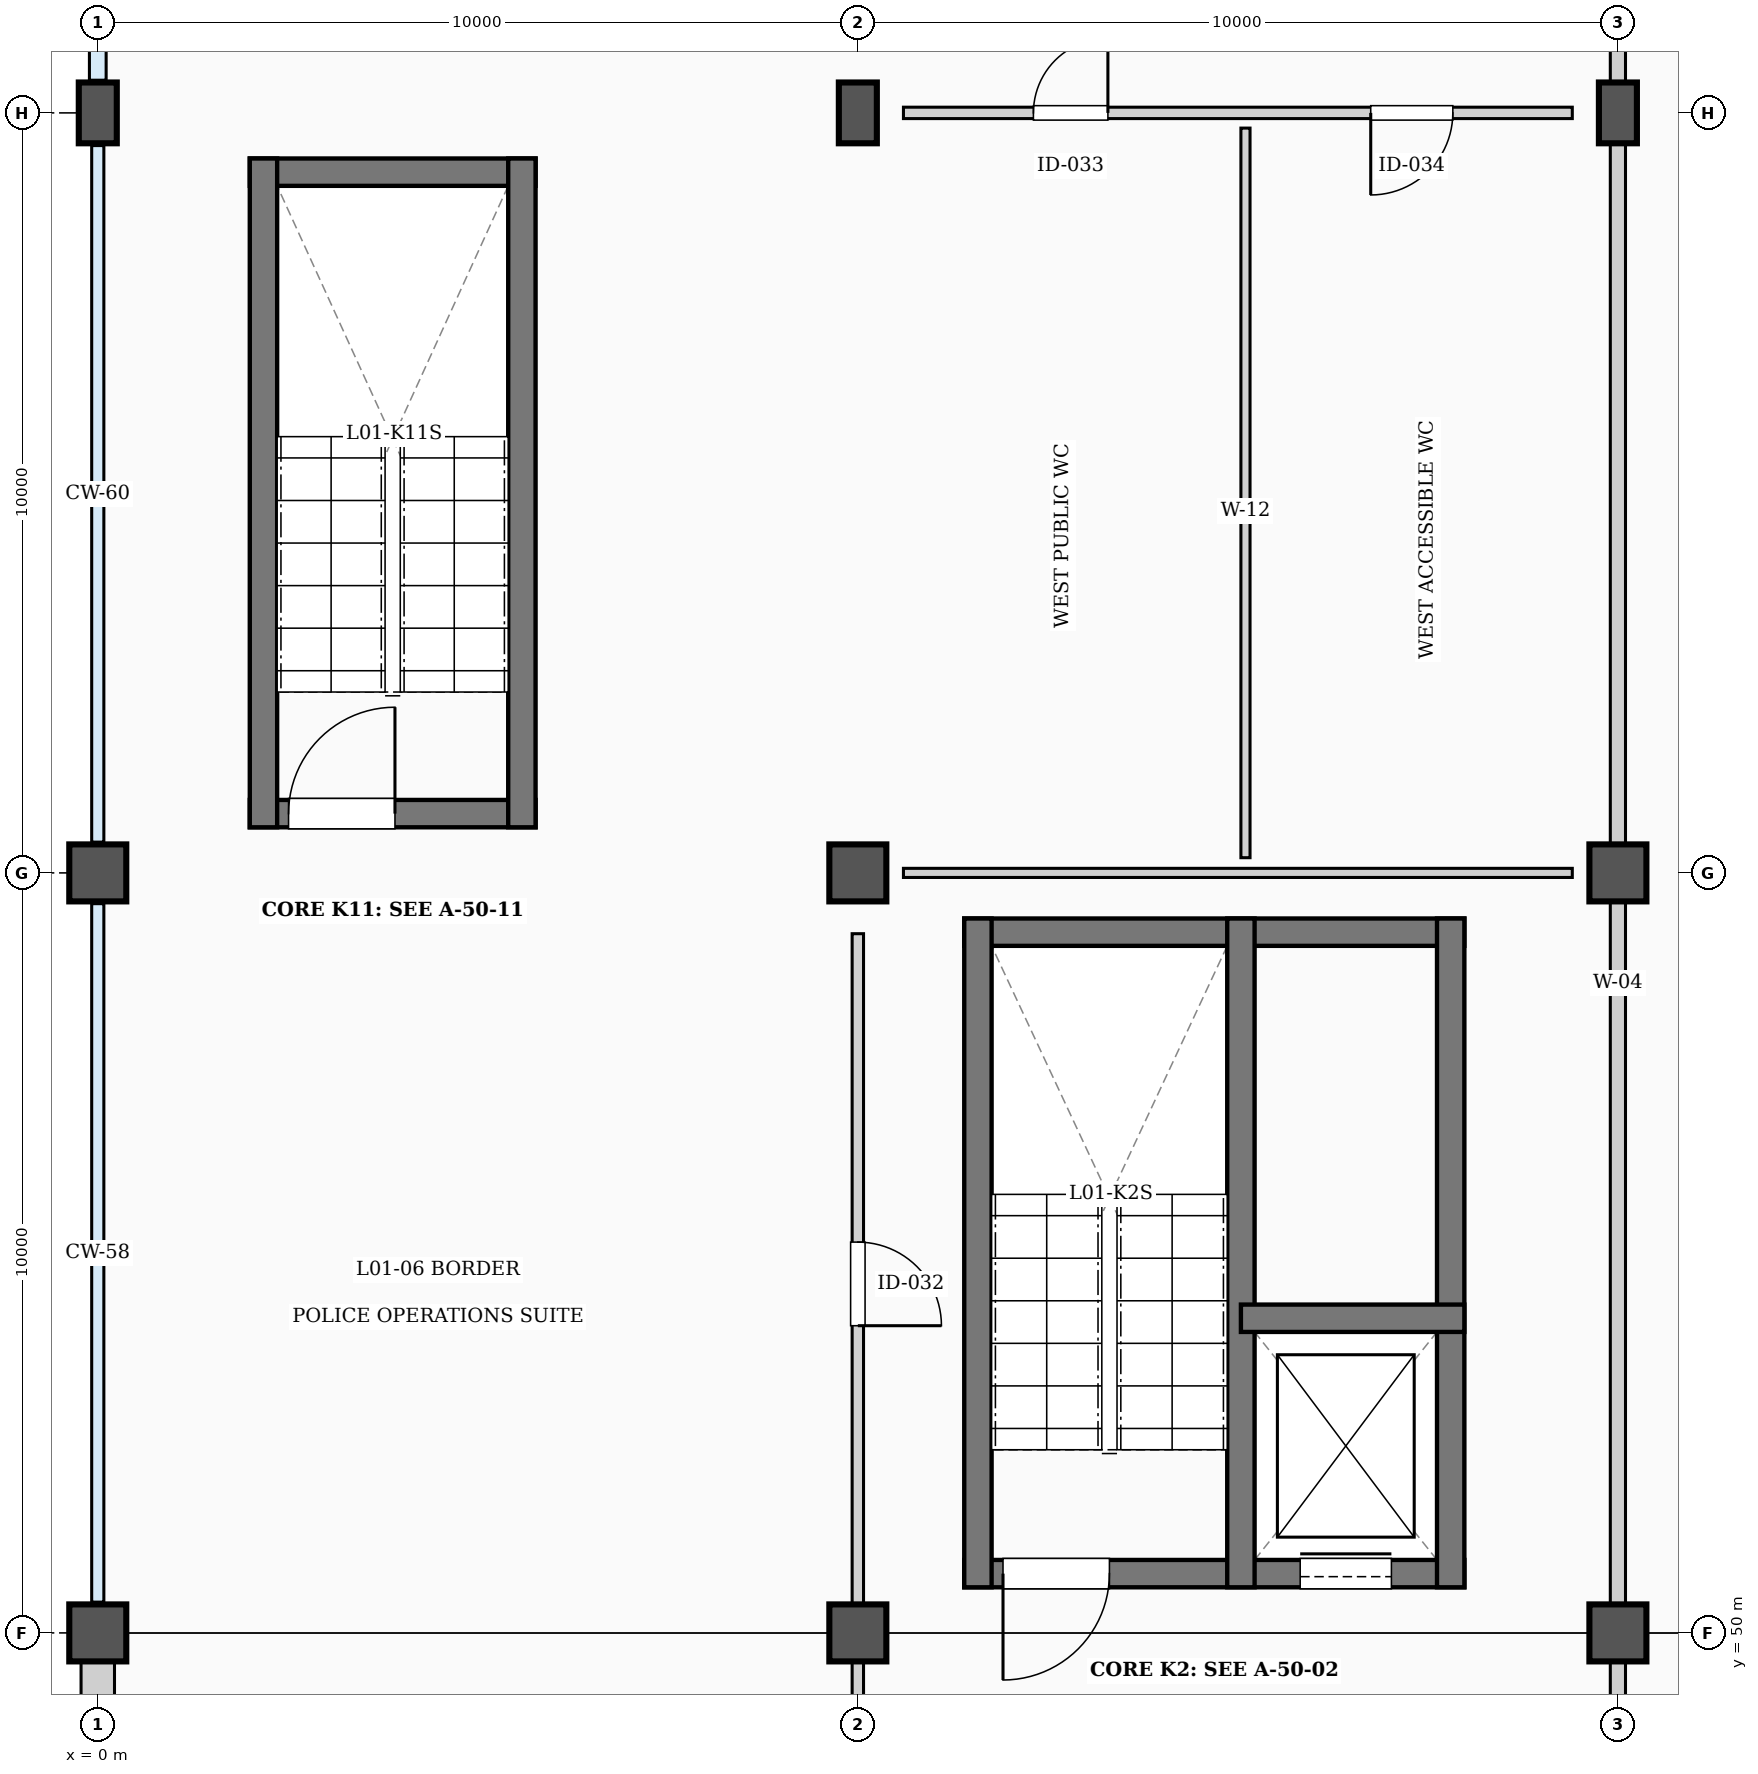
"""IFC4 building model, lengths in metres.
Left out: names, types, materials, properties, quantities, classifications, styles, units other than length and angle.
Written with IfcOpenShell. Run it as: python <this file> out.ifc"""

import sys

from ifc_helpers import new_model, si_unit, direction, frame, frame_2d, origin, origin_2d, place, context, subcontext, project, spatial, rectangle, extrude, element, fill, save


model = new_model("IFC4")
c1 = context("Model", 3, precision=1e-05, world=origin(), true_north=direction((0.0, 1.0)))
c2 = subcontext(c1, "Body", "Model", "MODEL_VIEW")
j1 = project(units=[si_unit("LENGTHUNIT", "METRE"), si_unit("PLANEANGLEUNIT", "RADIAN")], contexts=[c1])
p1 = place(None, origin())
s1 = spatial("IfcSite", under=j1, at=p1, CompositionType="ELEMENT")
p2 = place(p1, origin())
s2 = spatial("IfcBuilding", under=s1, at=p2, CompositionType="ELEMENT")
p3 = place(p2, frame((0.0, 0.0, 5.4)))
s3 = spatial("IfcBuildingStorey", under=s2, at=p3, CompositionType="ELEMENT", Elevation=5.4)
for number, where, z_axis, x_axis in (
    (1, (0.0, 50.0, 0.0), (0.0, 0.0, 1.0), (1.0, 0.0, 0.0)),
    (2, (0.0, 60.0, 0.0), (0.0, 0.0, 1.0), (1.0, 0.0, 0.0)),
):
    element("IfcColumn", number, at=place(p3, frame(where, z_axis=z_axis, x_axis=x_axis)), inside=s3, PredefinedType="COLUMN", context=c2, shape_type="SweptSolid", body=[
        extrude(rectangle(XDim=0.75, YDim=0.75, at=origin_2d()), origin(), (0.0, 0.0, 1.0), 4.8),
    ])
p4 = place(p3, frame((0.0, 70.0, 0.0), z_axis=(0.0, 0.0, 1.0), x_axis=(1.0, 0.0, 0.0)))
e3 = element("IfcColumn", 3, at=p4, inside=s3, PredefinedType="COLUMN", context=c2, shape_type="SweptSolid", body=[
    extrude(rectangle(XDim=0.5, YDim=0.8, at=origin_2d()), origin(), (0.0, 0.0, 1.0), 4.8),
])
for number, where, z_axis, x_axis in (
    (4, (10.0, 50.0, 0.0), (0.0, 0.0, 1.0), (1.0, 0.0, 0.0)),
    (5, (10.0, 60.0, 0.0), (0.0, 0.0, 1.0), (1.0, 0.0, 0.0)),
):
    element("IfcColumn", number, at=place(p3, frame(where, z_axis=z_axis, x_axis=x_axis)), inside=s3, PredefinedType="COLUMN", context=c2, shape_type="SweptSolid", body=[
        extrude(rectangle(XDim=0.75, YDim=0.75, at=origin_2d()), origin(), (0.0, 0.0, 1.0), 4.8),
    ])
p5 = place(p3, frame((10.0, 70.0, 0.0), z_axis=(0.0, 0.0, 1.0), x_axis=(1.0, 0.0, 0.0)))
e6 = element("IfcColumn", 6, at=p5, inside=s3, PredefinedType="COLUMN", context=c2, shape_type="SweptSolid", body=[
    extrude(rectangle(XDim=0.5, YDim=0.8, at=origin_2d()), origin(), (0.0, 0.0, 1.0), 4.8),
])
for number, where, z_axis, x_axis in (
    (7, (20.0, 50.0, 0.0), (0.0, 0.0, 1.0), (1.0, 0.0, 0.0)),
    (8, (20.0, 60.0, 0.0), (0.0, 0.0, 1.0), (1.0, 0.0, 0.0)),
):
    element("IfcColumn", number, at=place(p3, frame(where, z_axis=z_axis, x_axis=x_axis)), inside=s3, PredefinedType="COLUMN", context=c2, shape_type="SweptSolid", body=[
        extrude(rectangle(XDim=0.75, YDim=0.75, at=origin_2d()), origin(), (0.0, 0.0, 1.0), 4.8),
    ])
p6 = place(p3, frame((20.0, 70.0, 0.0), z_axis=(0.0, 0.0, 1.0), x_axis=(1.0, 0.0, 0.0)))
e9 = element("IfcColumn", 9, at=p6, inside=s3, PredefinedType="COLUMN", context=c2, shape_type="SweptSolid", body=[
    extrude(rectangle(XDim=0.5, YDim=0.8, at=origin_2d()), origin(), (0.0, 0.0, 1.0), 4.8),
])
p7 = place(p3, frame((0.0, 40.375, 0.0), z_axis=(0.0, 0.0, 1.0), x_axis=(0.0, 1.0, 0.0)))
e10 = element("IfcWall", 10, at=p7, inside=s3, PredefinedType="SOLIDWALL", context=c2, shape_type="SweptSolid", body=[
    extrude(rectangle(XDim=9.25, YDim=0.44, at=frame_2d((4.625, 0.0))), origin(), (0.0, 0.0, 1.0), 4.27),
])
p8 = place(p7, frame((1.84, 0.0, 0.9)))
e11 = element("IfcOpeningElement", 11, at=p8, cuts=e10, PredefinedType="OPENING", context=c2, shape_type="SweptSolid", body=[
    extrude(rectangle(XDim=1.5, YDim=3.0, at=frame_2d((0.75, 1.5))), frame((0.0, 0.23, 0.0), z_axis=(0.0, -1.0, 0.0), x_axis=(1.0, 0.0, 0.0)), (0.0, 0.0, 1.0), 0.46),
])
p9 = place(p7, frame((5.91, 0.0, 0.9)))
e12 = element("IfcOpeningElement", 12, at=p9, cuts=e10, PredefinedType="OPENING", context=c2, shape_type="SweptSolid", body=[
    extrude(rectangle(XDim=1.5, YDim=3.0, at=frame_2d((0.75, 1.5))), frame((0.0, 0.23, 0.0), z_axis=(0.0, -1.0, 0.0), x_axis=(1.0, 0.0, 0.0)), (0.0, 0.0, 1.0), 0.46),
])
p10 = place(p3, frame((11.4, 50.78, 0.0), z_axis=(0.0, 0.0, 1.0), x_axis=(1.0, 0.0, 0.0)))
e13 = element("IfcWall", 13, at=p10, inside=s3, PredefinedType="SHEAR", context=c2, shape_type="SweptSolid", body=[
    extrude(rectangle(XDim=6.58, YDim=0.36, at=frame_2d((3.29, 0.0))), origin(), (0.0, 0.0, 1.0), 4.8),
])
p11 = place(p10, frame((0.51, 0.0, 0.0)))
e14 = element("IfcOpeningElement", 14, at=p11, cuts=e13, PredefinedType="OPENING", context=c2, shape_type="SweptSolid", body=[
    extrude(rectangle(XDim=1.4, YDim=2.35, at=frame_2d((0.7, 1.175))), frame((0.0, 0.19, 0.0), z_axis=(0.0, -1.0, 0.0), x_axis=(1.0, 0.0, 0.0)), (0.0, 0.0, 1.0), 0.38),
])
p12 = place(p10, frame((4.42, 0.0, 0.0)))
e15 = element("IfcOpeningElement", 15, at=p12, cuts=e13, PredefinedType="OPENING", context=c2, shape_type="SweptSolid", body=[
    extrude(rectangle(XDim=1.2, YDim=2.35, at=frame_2d((0.6, 1.175))), frame((0.0, 0.19, 0.0), z_axis=(0.0, -1.0, 0.0), x_axis=(1.0, 0.0, 0.0)), (0.0, 0.0, 1.0), 0.38),
])
p13 = place(p3, frame((11.4, 59.22, 0.0), z_axis=(0.0, 0.0, 1.0), x_axis=(1.0, 0.0, 0.0)))
e16 = element("IfcWall", 16, at=p13, inside=s3, PredefinedType="SHEAR", context=c2, shape_type="SweptSolid", body=[
    extrude(rectangle(XDim=6.58, YDim=0.36, at=frame_2d((3.29, 0.0))), origin(), (0.0, 0.0, 1.0), 4.8),
])
for number, where, z_axis, x_axis in (
    (17, (11.58, 50.6, 0.0), (0.0, 0.0, 1.0), (0.0, 1.0, 0.0)),
    (18, (17.8, 50.6, 0.0), (0.0, 0.0, 1.0), (0.0, 1.0, 0.0)),
    (19, (15.04, 50.6, 0.0), (0.0, 0.0, 1.0), (0.0, 1.0, 0.0)),
):
    element("IfcWall", number, at=place(p3, frame(where, z_axis=z_axis, x_axis=x_axis)), inside=s3, PredefinedType="SHEAR", context=c2, shape_type="SweptSolid", body=[
        extrude(rectangle(XDim=8.8, YDim=0.36, at=frame_2d((4.4, 0.0))), origin(), (0.0, 0.0, 1.0), 4.8),
    ])
p14 = place(p3, frame((15.04, 54.14, 0.0), z_axis=(0.0, 0.0, 1.0), x_axis=(1.0, 0.0, 0.0)))
e20 = element("IfcWall", 20, at=p14, inside=s3, PredefinedType="SHEAR", context=c2, shape_type="SweptSolid", body=[
    extrude(rectangle(XDim=2.94, YDim=0.36, at=frame_2d((1.47, 0.0))), origin(), (0.0, 0.0, 1.0), 4.8),
])
p15 = place(p3, frame((2.0, 60.78, 0.0), z_axis=(0.0, 0.0, 1.0), x_axis=(1.0, 0.0, 0.0)))
e21 = element("IfcWall", 21, at=p15, inside=s3, PredefinedType="SHEAR", context=c2, shape_type="SweptSolid", body=[
    extrude(rectangle(XDim=3.76, YDim=0.36, at=frame_2d((1.88, 0.0))), origin(), (0.0, 0.0, 1.0), 4.8),
])
p16 = place(p15, frame((0.51, 0.0, 0.0)))
e22 = element("IfcOpeningElement", 22, at=p16, cuts=e21, PredefinedType="OPENING", context=c2, shape_type="SweptSolid", body=[
    extrude(rectangle(XDim=1.4, YDim=2.35, at=frame_2d((0.7, 1.175))), frame((0.0, 0.19, 0.0), z_axis=(0.0, -1.0, 0.0), x_axis=(1.0, 0.0, 0.0)), (0.0, 0.0, 1.0), 0.38),
])
p17 = place(p3, frame((2.0, 69.22, 0.0), z_axis=(0.0, 0.0, 1.0), x_axis=(1.0, 0.0, 0.0)))
e23 = element("IfcWall", 23, at=p17, inside=s3, PredefinedType="SHEAR", context=c2, shape_type="SweptSolid", body=[
    extrude(rectangle(XDim=3.76, YDim=0.36, at=frame_2d((1.88, 0.0))), origin(), (0.0, 0.0, 1.0), 4.8),
])
for number, where, z_axis, x_axis in (
    (24, (2.18, 60.6, 0.0), (0.0, 0.0, 1.0), (0.0, 1.0, 0.0)),
    (25, (5.58, 60.6, 0.0), (0.0, 0.0, 1.0), (0.0, 1.0, 0.0)),
):
    element("IfcWall", number, at=place(p3, frame(where, z_axis=z_axis, x_axis=x_axis)), inside=s3, PredefinedType="SHEAR", context=c2, shape_type="SweptSolid", body=[
        extrude(rectangle(XDim=8.8, YDim=0.36, at=frame_2d((4.4, 0.0))), origin(), (0.0, 0.0, 1.0), 4.8),
    ])
p18 = place(p3, frame((20.0, 10.8, 0.0), z_axis=(0.0, 0.0, 1.0), x_axis=(0.0, 1.0, 0.0)))
e26 = element("IfcWall", 26, at=p18, inside=s3, PredefinedType="PARTITIONING", context=c2, shape_type="SweptSolid", body=[
    extrude(rectangle(XDim=68.4, YDim=0.2, at=frame_2d((34.2, 0.0))), origin(), (0.0, 0.0, 1.0), 4.23),
])
p19 = place(p18, frame((4.288, 0.0, 0.0)))
e27 = element("IfcOpeningElement", 27, at=p19, cuts=e26, PredefinedType="OPENING", context=c2, shape_type="SweptSolid", body=[
    extrude(rectangle(XDim=1.0, YDim=2.3, at=frame_2d((0.5, 1.15))), frame((0.0, 0.11, 0.0), z_axis=(0.0, -1.0, 0.0), x_axis=(1.0, 0.0, 0.0)), (0.0, 0.0, 1.0), 0.22),
])
p20 = place(p18, frame((20.304, 0.0, 0.0)))
e28 = element("IfcOpeningElement", 28, at=p20, cuts=e26, PredefinedType="OPENING", context=c2, shape_type="SweptSolid", body=[
    extrude(rectangle(XDim=1.8, YDim=2.45, at=frame_2d((0.9, 1.225))), frame((0.0, 0.11, 0.0), z_axis=(0.0, -1.0, 0.0), x_axis=(1.0, 0.0, 0.0)), (0.0, 0.0, 1.0), 0.22),
])
p21 = place(p18, frame((30.464, 0.0, 0.0)))
e29 = element("IfcOpeningElement", 29, at=p21, cuts=e26, PredefinedType="OPENING", context=c2, shape_type="SweptSolid", body=[
    extrude(rectangle(XDim=2.0, YDim=2.45, at=frame_2d((1.0, 1.225))), frame((0.0, 0.11, 0.0), z_axis=(0.0, -1.0, 0.0), x_axis=(1.0, 0.0, 0.0)), (0.0, 0.0, 1.0), 0.22),
])
p22 = place(p18, frame((63.087, 0.0, 0.0)))
e30 = element("IfcOpeningElement", 30, at=p22, cuts=e26, PredefinedType="OPENING", context=c2, shape_type="SweptSolid", body=[
    extrude(rectangle(XDim=1.05, YDim=2.3, at=frame_2d((0.525, 1.15))), frame((0.0, 0.11, 0.0), z_axis=(0.0, -1.0, 0.0), x_axis=(1.0, 0.0, 0.0)), (0.0, 0.0, 1.0), 0.22),
])
p23 = place(p3, frame((10.0, 20.8, 0.0), z_axis=(0.0, 0.0, 1.0), x_axis=(0.0, 1.0, 0.0)))
e31 = element("IfcWall", 31, at=p23, inside=s3, PredefinedType="PARTITIONING", context=c2, shape_type="SweptSolid", body=[
    extrude(rectangle(XDim=38.4, YDim=0.15, at=frame_2d((19.2, 0.0))), origin(), (0.0, 0.0, 1.0), 4.23),
])
p24 = place(p23, frame((14.092, 0.0, 0.0)))
e32 = element("IfcOpeningElement", 32, at=p24, cuts=e31, PredefinedType="OPENING", context=c2, shape_type="SweptSolid", body=[
    extrude(rectangle(XDim=1.0, YDim=2.4, at=frame_2d((0.5, 1.2))), frame((0.0, 0.085, 0.0), z_axis=(0.0, -1.0, 0.0), x_axis=(1.0, 0.0, 0.0)), (0.0, 0.0, 1.0), 0.17),
])
p25 = place(p23, frame((33.242, 0.0, 0.0)))
e33 = element("IfcOpeningElement", 33, at=p25, cuts=e31, PredefinedType="OPENING", context=c2, shape_type="SweptSolid", body=[
    extrude(rectangle(XDim=1.1, YDim=2.3, at=frame_2d((0.55, 1.15))), frame((0.0, 0.085, 0.0), z_axis=(0.0, -1.0, 0.0), x_axis=(1.0, 0.0, 0.0)), (0.0, 0.0, 1.0), 0.17),
])
p26 = place(p3, frame((10.6, 60.0, 0.0), z_axis=(0.0, 0.0, 1.0), x_axis=(1.0, 0.0, 0.0)))
e34 = element("IfcWall", 34, at=p26, inside=s3, PredefinedType="PARTITIONING", context=c2, shape_type="SweptSolid", body=[
    extrude(rectangle(XDim=8.8, YDim=0.12, at=frame_2d((4.4, 0.0))), origin(), (0.0, 0.0, 1.0), 4.02),
])
p27 = place(p3, frame((15.1, 60.2, 0.0), z_axis=(0.0, 0.0, 1.0), x_axis=(0.0, 1.0, 0.0)))
e35 = element("IfcWall", 35, at=p27, inside=s3, PredefinedType="PARTITIONING", context=c2, shape_type="SweptSolid", body=[
    extrude(rectangle(XDim=9.6, YDim=0.12, at=frame_2d((4.8, 0.0))), origin(), (0.0, 0.0, 1.0), 4.46),
])
p28 = place(p3, frame((10.6, 70.0, 0.0), z_axis=(0.0, 0.0, 1.0), x_axis=(1.0, 0.0, 0.0)))
e36 = element("IfcWall", 36, at=p28, inside=s3, PredefinedType="PARTITIONING", context=c2, shape_type="SweptSolid", body=[
    extrude(rectangle(XDim=8.8, YDim=0.15, at=frame_2d((4.4, 0.0))), origin(), (0.0, 0.0, 1.0), 4.02),
])
p29 = place(p28, frame((1.71, 0.0, 0.0)))
e37 = element("IfcOpeningElement", 37, at=p29, cuts=e36, PredefinedType="OPENING", context=c2, shape_type="SweptSolid", body=[
    extrude(rectangle(XDim=0.98, YDim=2.3, at=frame_2d((0.49, 1.15))), frame((0.0, 0.085, 0.0), z_axis=(0.0, -1.0, 0.0), x_axis=(1.0, 0.0, 0.0)), (0.0, 0.0, 1.0), 0.17),
])
p30 = place(p28, frame((6.148, 0.0, 0.0)))
e38 = element("IfcOpeningElement", 38, at=p30, cuts=e36, PredefinedType="OPENING", context=c2, shape_type="SweptSolid", body=[
    extrude(rectangle(XDim=1.08, YDim=2.35, at=frame_2d((0.54, 1.175))), frame((0.0, 0.085, 0.0), z_axis=(0.0, -1.0, 0.0), x_axis=(1.0, 0.0, 0.0)), (0.0, 0.0, 1.0), 0.17),
])
p31 = place(p11, origin())
e39 = element("IfcDoor", 39, at=p31, inside=s3, OperationType="SINGLE_SWING_LEFT", PredefinedType="DOOR", context=c2, shape_type="SweptSolid", body=[
    extrude(rectangle(XDim=1.4, YDim=2.35, at=frame_2d((0.7, 1.175))), frame((0.0, 0.025, 0.0), z_axis=(0.0, -1.0, 0.0), x_axis=(1.0, 0.0, 0.0)), (0.0, 0.0, 1.0), 0.05),
])
fill(e14, e39)
p32 = place(p12, origin())
e40 = element("IfcDoor", 40, at=p32, inside=s3, OperationType="SLIDING_TO_LEFT", PredefinedType="DOOR", context=c2, shape_type="SweptSolid", body=[
    extrude(rectangle(XDim=1.2, YDim=2.35, at=frame_2d((0.6, 1.175))), frame((0.0, 0.025, 0.0), z_axis=(0.0, -1.0, 0.0), x_axis=(1.0, 0.0, 0.0)), (0.0, 0.0, 1.0), 0.05),
])
fill(e15, e40)
p33 = place(p16, origin())
e41 = element("IfcDoor", 41, at=p33, inside=s3, OperationType="SINGLE_SWING_RIGHT", PredefinedType="DOOR", context=c2, shape_type="SweptSolid", body=[
    extrude(rectangle(XDim=1.4, YDim=2.35, at=frame_2d((0.7, 1.175))), frame((0.0, 0.025, 0.0), z_axis=(0.0, -1.0, 0.0), x_axis=(1.0, 0.0, 0.0)), (0.0, 0.0, 1.0), 0.05),
])
fill(e22, e41)
p34 = place(p25, origin())
e42 = element("IfcDoor", 42, at=p34, inside=s3, OperationType="SINGLE_SWING_LEFT", PredefinedType="DOOR", context=c2, shape_type="SweptSolid", body=[
    extrude(rectangle(XDim=1.1, YDim=2.3, at=frame_2d((0.55, 1.15))), frame((0.0, 0.025, 0.0), z_axis=(0.0, -1.0, 0.0), x_axis=(1.0, 0.0, 0.0)), (0.0, 0.0, 1.0), 0.05),
])
fill(e33, e42)
p35 = place(p29, origin())
e43 = element("IfcDoor", 43, at=p35, inside=s3, OperationType="SINGLE_SWING_RIGHT", PredefinedType="DOOR", context=c2, shape_type="SweptSolid", body=[
    extrude(rectangle(XDim=0.98, YDim=2.3, at=frame_2d((0.49, 1.15))), frame((0.0, 0.025, 0.0), z_axis=(0.0, -1.0, 0.0), x_axis=(1.0, 0.0, 0.0)), (0.0, 0.0, 1.0), 0.05),
])
fill(e37, e43)
p36 = place(p30, origin())
e44 = element("IfcDoor", 44, at=p36, inside=s3, OperationType="SINGLE_SWING_LEFT", PredefinedType="DOOR", context=c2, shape_type="SweptSolid", body=[
    extrude(rectangle(XDim=1.08, YDim=2.35, at=frame_2d((0.54, 1.175))), frame((0.0, 0.025, 0.0), z_axis=(0.0, -1.0, 0.0), x_axis=(1.0, 0.0, 0.0)), (0.0, 0.0, 1.0), 0.05),
])
fill(e38, e44)
save(model, sys.argv[1])
